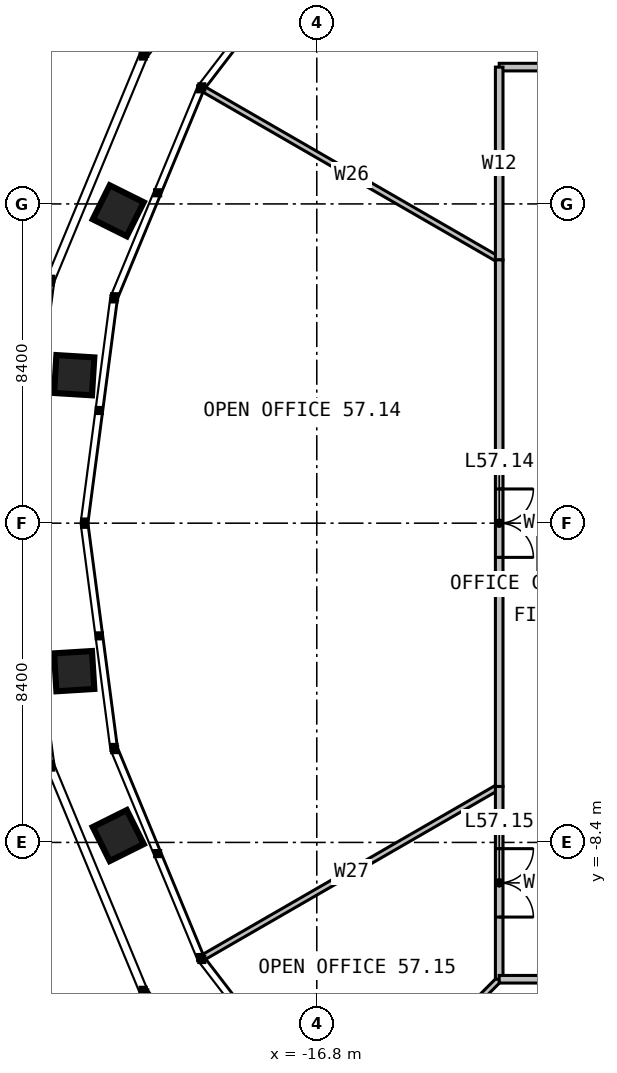
"""IFC4 building model, lengths in metres.
Left out: names, types, materials, properties, quantities, classifications, styles, units other than length and angle.
Written with IfcOpenShell. Run it as: python <this file> out.ifc"""

import sys

from ifc_helpers import new_model, si_unit, direction, frame, frame_2d, origin, place, context, subcontext, project, spatial, rectangle, extrude, element, fill, save


model = new_model("IFC4")
c1 = context("Model", 3, precision=1e-05, world=origin(), true_north=direction((0.0, 1.0)))
c2 = subcontext(c1, "Body", "Model", "MODEL_VIEW")
j1 = project(units=[si_unit("LENGTHUNIT", "METRE"), si_unit("PLANEANGLEUNIT", "RADIAN")], contexts=[c1])
p1 = place(None, origin())
s1 = spatial("IfcSite", under=j1, at=p1, CompositionType="ELEMENT")
p2 = place(p1, origin())
s2 = spatial("IfcBuilding", under=s1, at=p2, CompositionType="ELEMENT")
p3 = place(p2, frame((0.0, 0.0, 236.0)))
s3 = spatial("IfcBuildingStorey", under=s2, at=p3, CompositionType="ELEMENT", Elevation=236.0)
for number, where, z_axis, x_axis in (
    (1, (-6.928, 12.0, 0.0), (0.0, 0.0, 1.0), (-0.5, 0.866, 0.0)),
    (2, (-12.0, 6.928, 0.0), (0.0, 0.0, 1.0), (-0.866, 0.5, 0.0)),
    (3, (-12.0, -6.928, 0.0), (0.0, 0.0, 1.0), (-0.866, -0.5, 0.0)),
):
    element("IfcWall", number, at=place(p3, frame(where, z_axis=z_axis, x_axis=x_axis)), inside=s3, PredefinedType="PARTITIONING", context=c2, shape_type="SweptSolid", body=[
        extrude(rectangle(XDim=8.966, YDim=0.15, at=frame_2d((4.483, 0.0))), origin(), (0.0, 0.0, 1.0), 2.79),
    ])
p4 = place(p3, frame((-12.0, -12.0, 0.0), z_axis=(0.0, 0.0, 1.0), x_axis=(-0.707106781187, -0.707106781187, 0.0)))
e4 = element("IfcWall", 4, at=p4, inside=s3, PredefinedType="PARTITIONING", context=c2, shape_type="SweptSolid", body=[
    extrude(rectangle(XDim=5.852, YDim=0.15, at=frame_2d((2.926, 0.0))), origin(), (0.0, 0.0, 1.0), 2.79),
])
p5 = place(p3, frame((-6.928, -12.0, 0.0), z_axis=(0.0, 0.0, 1.0), x_axis=(-0.499999020506, -0.866025969295, 0.0)))
e5 = element("IfcWall", 5, at=p5, inside=s3, PredefinedType="PARTITIONING", context=c2, shape_type="SweptSolid", body=[
    extrude(rectangle(XDim=8.966, YDim=0.15, at=frame_2d((4.483, 0.0))), origin(), (0.0, 0.0, 1.0), 2.79),
])
p6 = place(p3, frame((-6.928, 12.0, 0.0), z_axis=(0.0, 0.0, 1.0), x_axis=(-1.0, 0.0, 0.0)))
e6 = element("IfcWall", 6, at=p6, inside=s3, PredefinedType="PARTITIONING", context=c2, shape_type="SweptSolid", body=[
    extrude(rectangle(XDim=5.072, YDim=0.2, at=frame_2d((2.536, 0.0))), origin(), (0.0, 0.0, 1.0), 3.8),
])
p7 = place(p6, frame((1.636, 0.0, 0.0)))
e7 = element("IfcOpeningElement", 7, at=p7, cuts=e6, PredefinedType="OPENING", context=c2, shape_type="SweptSolid", body=[
    extrude(rectangle(XDim=1.8, YDim=2.2, at=frame_2d((0.9, 1.1))), frame((0.0, 0.11, 0.0), z_axis=(0.0, -1.0, 0.0), x_axis=(1.0, 0.0, 0.0)), (0.0, 0.0, 1.0), 0.22),
])
p8 = place(p3, frame((-12.0, 12.0, 0.0), z_axis=(0.0, 0.0, 1.0), x_axis=(0.0, -1.0, 0.0)))
e8 = element("IfcWall", 8, at=p8, inside=s3, PredefinedType="PARTITIONING", context=c2, shape_type="SweptSolid", body=[
    extrude(rectangle(XDim=5.072, YDim=0.2, at=frame_2d((2.536, 0.0))), origin(), (0.0, 0.0, 1.0), 3.8),
])
p9 = place(p3, frame((-12.0, 6.928, 0.0), z_axis=(0.0, 0.0, 1.0), x_axis=(0.0, -1.0, 0.0)))
e9 = element("IfcWall", 9, at=p9, inside=s3, PredefinedType="PARTITIONING", context=c2, shape_type="SweptSolid", body=[
    extrude(rectangle(XDim=13.856, YDim=0.2, at=frame_2d((6.928, 0.0))), origin(), (0.0, 0.0, 1.0), 3.8),
])
p10 = place(p9, frame((6.028, 0.0, 0.0)))
e10 = element("IfcOpeningElement", 10, at=p10, cuts=e9, PredefinedType="OPENING", context=c2, shape_type="SweptSolid", body=[
    extrude(rectangle(XDim=1.8, YDim=2.2, at=frame_2d((0.9, 1.1))), frame((0.0, 0.11, 0.0), z_axis=(0.0, -1.0, 0.0), x_axis=(1.0, 0.0, 0.0)), (0.0, 0.0, 1.0), 0.22),
])
p11 = place(p3, frame((-12.0, -6.928, 0.0), z_axis=(0.0, 0.0, 1.0), x_axis=(0.0, -1.0, 0.0)))
e11 = element("IfcWall", 11, at=p11, inside=s3, PredefinedType="PARTITIONING", context=c2, shape_type="SweptSolid", body=[
    extrude(rectangle(XDim=5.072, YDim=0.2, at=frame_2d((2.536, 0.0))), origin(), (0.0, 0.0, 1.0), 3.8),
])
p12 = place(p11, frame((1.636, 0.0, 0.0)))
e12 = element("IfcOpeningElement", 12, at=p12, cuts=e11, PredefinedType="OPENING", context=c2, shape_type="SweptSolid", body=[
    extrude(rectangle(XDim=1.8, YDim=2.2, at=frame_2d((0.9, 1.1))), frame((0.0, 0.11, 0.0), z_axis=(0.0, -1.0, 0.0), x_axis=(1.0, 0.0, 0.0)), (0.0, 0.0, 1.0), 0.22),
])
p13 = place(p3, frame((-12.0, -12.0, 0.0), z_axis=(0.0, 0.0, 1.0), x_axis=(1.0, 0.0, 0.0)))
e13 = element("IfcWall", 13, at=p13, inside=s3, PredefinedType="PARTITIONING", context=c2, shape_type="SweptSolid", body=[
    extrude(rectangle(XDim=5.072, YDim=0.2, at=frame_2d((2.536, 0.0))), origin(), (0.0, 0.0, 1.0), 3.8),
])
p14 = place(p13, frame((1.636, 0.0, 0.0)))
e14 = element("IfcOpeningElement", 14, at=p14, cuts=e13, PredefinedType="OPENING", context=c2, shape_type="SweptSolid", body=[
    extrude(rectangle(XDim=1.8, YDim=2.2, at=frame_2d((0.9, 1.1))), frame((0.0, 0.11, 0.0), z_axis=(0.0, -1.0, 0.0), x_axis=(1.0, 0.0, 0.0)), (0.0, 0.0, 1.0), 0.22),
])
p15 = place(p10, origin())
e15 = element("IfcDoor", 15, at=p15, inside=s3, OperationType="DOUBLE_DOOR_SINGLE_SWING", PredefinedType="DOOR", context=c2, shape_type="SweptSolid", body=[
    extrude(rectangle(XDim=1.8, YDim=2.2, at=frame_2d((0.9, 1.1))), frame((0.0, 0.025, 0.0), z_axis=(0.0, -1.0, 0.0), x_axis=(1.0, 0.0, 0.0)), (0.0, 0.0, 1.0), 0.05),
])
fill(e10, e15)
p16 = place(p12, origin())
e16 = element("IfcDoor", 16, at=p16, inside=s3, OperationType="DOUBLE_DOOR_SINGLE_SWING", PredefinedType="DOOR", context=c2, shape_type="SweptSolid", body=[
    extrude(rectangle(XDim=1.8, YDim=2.2, at=frame_2d((0.9, 1.1))), frame((0.0, 0.025, 0.0), z_axis=(0.0, -1.0, 0.0), x_axis=(1.0, 0.0, 0.0)), (0.0, 0.0, 1.0), 0.05),
])
fill(e12, e16)
save(model, sys.argv[1])
